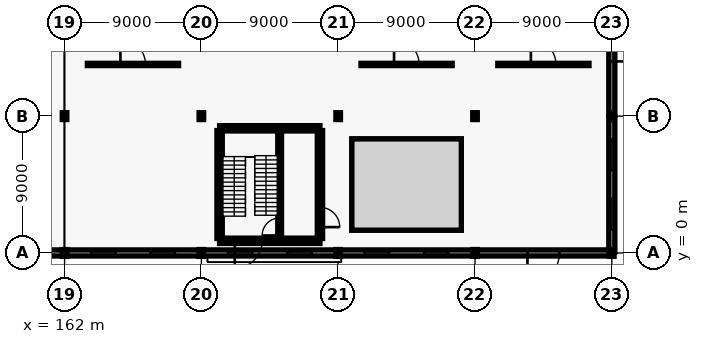
"""IFC4 building model, lengths in metres.
Left out: names, types, materials, properties, quantities, classifications, styles, units other than length and angle.
Written with IfcOpenShell. Run it as: python <this file> out.ifc"""

import sys

from ifc_helpers import new_model, si_unit, direction, frame, frame_2d, origin, origin_2d, place, context, subcontext, project, spatial, rectangle, i_section, extrude, element, fill, save


model = new_model("IFC4")
c1 = context("Model", 3, precision=1e-05, world=origin(), true_north=direction((0.0, 1.0)))
c2 = subcontext(c1, "Body", "Model", "MODEL_VIEW")
j1 = project(units=[si_unit("LENGTHUNIT", "METRE"), si_unit("PLANEANGLEUNIT", "RADIAN")], contexts=[c1])
p1 = place(None, origin())
s1 = spatial("IfcSite", under=j1, at=p1, CompositionType="ELEMENT")
p2 = place(p1, origin())
s2 = spatial("IfcBuilding", under=s1, at=p2, CompositionType="ELEMENT")
p3 = place(p2, origin())
s3 = spatial("IfcBuildingStorey", under=s2, at=p3, CompositionType="ELEMENT", Elevation=0.0)
for number, where, z_axis, x_axis in (
    (1, (162.0, 0.0, 0.0), (0.0, 0.0, 1.0), (1.0, 0.0, 0.0)),
    (2, (162.0, 9.0, 0.0), (0.0, 0.0, 1.0), (1.0, 0.0, 0.0)),
    (3, (171.0, 0.0, 0.0), (0.0, 0.0, 1.0), (1.0, 0.0, 0.0)),
    (4, (171.0, 9.0, 0.0), (0.0, 0.0, 1.0), (1.0, 0.0, 0.0)),
    (5, (180.0, 0.0, 0.0), (0.0, 0.0, 1.0), (1.0, 0.0, 0.0)),
    (6, (180.0, 9.0, 0.0), (0.0, 0.0, 1.0), (1.0, 0.0, 0.0)),
    (7, (189.0, 0.0, 0.0), (0.0, 0.0, 1.0), (1.0, 0.0, 0.0)),
    (8, (189.0, 9.0, 0.0), (0.0, 0.0, 1.0), (1.0, 0.0, 0.0)),
    (9, (198.0, 0.0, 0.0), (0.0, 0.0, 1.0), (1.0, 0.0, 0.0)),
    (10, (198.0, 9.0, 0.0), (0.0, 0.0, 1.0), (1.0, 0.0, 0.0)),
):
    element("IfcColumn", number, at=place(p3, frame(where, z_axis=z_axis, x_axis=x_axis)), inside=s3, PredefinedType="COLUMN", context=c2, shape_type="SweptSolid", body=[
        extrude(i_section(OverallWidth=0.3, OverallDepth=0.45, WebThickness=0.014, FlangeThickness=0.026, FilletRadius=0.027, at=origin_2d()), origin(), (0.0, 0.0, 1.0), 5.4),
    ])
p4 = place(p3, frame((153.06, 0.0, 0.0), z_axis=(0.0, 0.0, 1.0), x_axis=(1.0, 0.0, 0.0)))
e11 = element("IfcWall", 11, at=p4, inside=s3, PredefinedType="SOLIDWALL", context=c2, shape_type="SweptSolid", body=[
    extrude(rectangle(XDim=8.88, YDim=0.4, at=frame_2d((4.44, 0.0))), origin(), (0.0, 0.0, 1.0), 4.7),
])
p5 = place(p4, frame((3.24, 0.0, 0.0)))
e12 = element("IfcOpeningElement", 12, at=p5, cuts=e11, PredefinedType="OPENING", context=c2, shape_type="SweptSolid", body=[
    extrude(rectangle(XDim=2.4, YDim=2.5, at=frame_2d((1.2, 1.25))), frame((0.0, 0.21, 0.0), z_axis=(0.0, -1.0, 0.0), x_axis=(1.0, 0.0, 0.0)), (0.0, 0.0, 1.0), 0.42),
])
p6 = place(p3, frame((162.06, 0.0, 0.0), z_axis=(0.0, 0.0, 1.0), x_axis=(1.0, 0.0, 0.0)))
e13 = element("IfcWall", 13, at=p6, inside=s3, PredefinedType="SOLIDWALL", context=c2, shape_type="SweptSolid", body=[
    extrude(rectangle(XDim=8.88, YDim=0.4, at=frame_2d((4.44, 0.0))), origin(), (0.0, 0.0, 1.0), 4.7),
])
p7 = place(p6, frame((1.686, 0.0, 0.9)))
e14 = element("IfcOpeningElement", 14, at=p7, cuts=e13, PredefinedType="OPENING", context=c2, shape_type="SweptSolid", body=[
    extrude(rectangle(XDim=1.6, YDim=2.4, at=frame_2d((0.8, 1.2))), frame((0.0, 0.21, 0.0), z_axis=(0.0, -1.0, 0.0), x_axis=(1.0, 0.0, 0.0)), (0.0, 0.0, 1.0), 0.42),
])
p8 = place(p6, frame((5.594, 0.0, 0.9)))
e15 = element("IfcOpeningElement", 15, at=p8, cuts=e13, PredefinedType="OPENING", context=c2, shape_type="SweptSolid", body=[
    extrude(rectangle(XDim=1.6, YDim=2.4, at=frame_2d((0.8, 1.2))), frame((0.0, 0.21, 0.0), z_axis=(0.0, -1.0, 0.0), x_axis=(1.0, 0.0, 0.0)), (0.0, 0.0, 1.0), 0.42),
])
p9 = place(p3, frame((171.06, 0.0, 0.0), z_axis=(0.0, 0.0, 1.0), x_axis=(1.0, 0.0, 0.0)))
e16 = element("IfcWall", 16, at=p9, inside=s3, PredefinedType="SOLIDWALL", context=c2, shape_type="SweptSolid", body=[
    extrude(rectangle(XDim=8.88, YDim=0.4, at=frame_2d((4.44, 0.0))), origin(), (0.0, 0.0, 1.0), 4.7),
])
p10 = place(p9, frame((1.686, 0.0, 0.9)))
e17 = element("IfcOpeningElement", 17, at=p10, cuts=e16, PredefinedType="OPENING", context=c2, shape_type="SweptSolid", body=[
    extrude(rectangle(XDim=1.6, YDim=2.4, at=frame_2d((0.8, 1.2))), frame((0.0, 0.21, 0.0), z_axis=(0.0, -1.0, 0.0), x_axis=(1.0, 0.0, 0.0)), (0.0, 0.0, 1.0), 0.42),
])
p11 = place(p9, frame((5.594, 0.0, 0.9)))
e18 = element("IfcOpeningElement", 18, at=p11, cuts=e16, PredefinedType="OPENING", context=c2, shape_type="SweptSolid", body=[
    extrude(rectangle(XDim=1.6, YDim=2.4, at=frame_2d((0.8, 1.2))), frame((0.0, 0.21, 0.0), z_axis=(0.0, -1.0, 0.0), x_axis=(1.0, 0.0, 0.0)), (0.0, 0.0, 1.0), 0.42),
])
p12 = place(p3, frame((180.06, 0.0, 0.0), z_axis=(0.0, 0.0, 1.0), x_axis=(1.0, 0.0, 0.0)))
e19 = element("IfcWall", 19, at=p12, inside=s3, PredefinedType="SOLIDWALL", context=c2, shape_type="SweptSolid", body=[
    extrude(rectangle(XDim=8.88, YDim=0.4, at=frame_2d((4.44, 0.0))), origin(), (0.0, 0.0, 1.0), 4.7),
])
p13 = place(p12, frame((1.686, 0.0, 0.9)))
e20 = element("IfcOpeningElement", 20, at=p13, cuts=e19, PredefinedType="OPENING", context=c2, shape_type="SweptSolid", body=[
    extrude(rectangle(XDim=1.6, YDim=2.4, at=frame_2d((0.8, 1.2))), frame((0.0, 0.21, 0.0), z_axis=(0.0, -1.0, 0.0), x_axis=(1.0, 0.0, 0.0)), (0.0, 0.0, 1.0), 0.42),
])
p14 = place(p12, frame((5.594, 0.0, 0.9)))
e21 = element("IfcOpeningElement", 21, at=p14, cuts=e19, PredefinedType="OPENING", context=c2, shape_type="SweptSolid", body=[
    extrude(rectangle(XDim=1.6, YDim=2.4, at=frame_2d((0.8, 1.2))), frame((0.0, 0.21, 0.0), z_axis=(0.0, -1.0, 0.0), x_axis=(1.0, 0.0, 0.0)), (0.0, 0.0, 1.0), 0.42),
])
p15 = place(p3, frame((189.06, 0.0, 0.0), z_axis=(0.0, 0.0, 1.0), x_axis=(1.0, 0.0, 0.0)))
e22 = element("IfcWall", 22, at=p15, inside=s3, PredefinedType="SOLIDWALL", context=c2, shape_type="SweptSolid", body=[
    extrude(rectangle(XDim=8.88, YDim=0.4, at=frame_2d((4.44, 0.0))), origin(), (0.0, 0.0, 1.0), 4.7),
])
p16 = place(p15, frame((3.39, 0.0, 0.0)))
e23 = element("IfcOpeningElement", 23, at=p16, cuts=e22, PredefinedType="OPENING", context=c2, shape_type="SweptSolid", body=[
    extrude(rectangle(XDim=2.1, YDim=2.35, at=frame_2d((1.05, 1.175))), frame((0.0, 0.21, 0.0), z_axis=(0.0, -1.0, 0.0), x_axis=(1.0, 0.0, 0.0)), (0.0, 0.0, 1.0), 0.42),
])
p17 = place(p3, frame((198.0, 0.06, 0.0), z_axis=(0.0, 0.0, 1.0), x_axis=(0.0, 1.0, 0.0)))
e24 = element("IfcWall", 24, at=p17, inside=s3, PredefinedType="SOLIDWALL", context=c2, shape_type="SweptSolid", body=[
    extrude(rectangle(XDim=8.88, YDim=0.4, at=frame_2d((4.44, 0.0))), origin(), (0.0, 0.0, 1.0), 4.7),
])
p18 = place(p17, frame((1.486, 0.0, 0.9)))
e25 = element("IfcOpeningElement", 25, at=p18, cuts=e24, PredefinedType="OPENING", context=c2, shape_type="SweptSolid", body=[
    extrude(rectangle(XDim=2.0, YDim=2.4, at=frame_2d((1.0, 1.2))), frame((0.0, 0.21, 0.0), z_axis=(0.0, -1.0, 0.0), x_axis=(1.0, 0.0, 0.0)), (0.0, 0.0, 1.0), 0.42),
])
p19 = place(p17, frame((5.394, 0.0, 0.9)))
e26 = element("IfcOpeningElement", 26, at=p19, cuts=e24, PredefinedType="OPENING", context=c2, shape_type="SweptSolid", body=[
    extrude(rectangle(XDim=2.0, YDim=2.4, at=frame_2d((1.0, 1.2))), frame((0.0, 0.21, 0.0), z_axis=(0.0, -1.0, 0.0), x_axis=(1.0, 0.0, 0.0)), (0.0, 0.0, 1.0), 0.42),
])
p20 = place(p3, frame((198.0, 9.06, 0.0), z_axis=(0.0, 0.0, 1.0), x_axis=(0.0, 1.0, 0.0)))
e27 = element("IfcWall", 27, at=p20, inside=s3, PredefinedType="SOLIDWALL", context=c2, shape_type="SweptSolid", body=[
    extrude(rectangle(XDim=8.88, YDim=0.4, at=frame_2d((4.44, 0.0))), origin(), (0.0, 0.0, 1.0), 4.7),
])
p21 = place(p20, frame((3.54, 0.0, 0.0)))
e28 = element("IfcOpeningElement", 28, at=p21, cuts=e27, PredefinedType="OPENING", context=c2, shape_type="SweptSolid", body=[
    extrude(rectangle(XDim=1.8, YDim=2.2, at=frame_2d((0.9, 1.1))), frame((0.0, 0.21, 0.0), z_axis=(0.0, -1.0, 0.0), x_axis=(1.0, 0.0, 0.0)), (0.0, 0.0, 1.0), 0.42),
])
p22 = place(p3, frame((172.2, 0.8, 0.0), z_axis=(0.0, 0.0, 1.0), x_axis=(1.0, 0.0, 0.0)))
e29 = element("IfcWall", 29, at=p22, inside=s3, PredefinedType="SHEAR", context=c2, shape_type="SweptSolid", body=[
    extrude(rectangle(XDim=6.6, YDim=0.35, at=frame_2d((3.3, 0.0))), origin(), (0.0, 0.0, 1.0), 5.4),
])
p23 = place(p22, frame((1.0, 0.0, 0.0)))
e30 = element("IfcOpeningElement", 30, at=p23, cuts=e29, PredefinedType="OPENING", context=c2, shape_type="SweptSolid", body=[
    extrude(rectangle(XDim=1.8, YDim=2.15, at=frame_2d((0.9, 1.075))), frame((0.0, 0.185, 0.0), z_axis=(0.0, -1.0, 0.0), x_axis=(1.0, 0.0, 0.0)), (0.0, 0.0, 1.0), 0.37),
])
p24 = place(p3, frame((172.2, 8.2, 0.0), z_axis=(0.0, 0.0, 1.0), x_axis=(1.0, 0.0, 0.0)))
e31 = element("IfcWall", 31, at=p24, inside=s3, PredefinedType="SHEAR", context=c2, shape_type="SweptSolid", body=[
    extrude(rectangle(XDim=6.6, YDim=0.35, at=frame_2d((3.3, 0.0))), origin(), (0.0, 0.0, 1.0), 5.4),
])
p25 = place(p3, frame((172.2, 0.95, 0.0), z_axis=(0.0, 0.0, 1.0), x_axis=(0.0, 1.0, 0.0)))
e32 = element("IfcWall", 32, at=p25, inside=s3, PredefinedType="SHEAR", context=c2, shape_type="SweptSolid", body=[
    extrude(rectangle(XDim=7.1, YDim=0.35, at=frame_2d((3.55, 0.0))), origin(), (0.0, 0.0, 1.0), 5.4),
])
p26 = place(p3, frame((178.8, 0.95, 0.0), z_axis=(0.0, 0.0, 1.0), x_axis=(0.0, 1.0, 0.0)))
e33 = element("IfcWall", 33, at=p26, inside=s3, PredefinedType="SHEAR", context=c2, shape_type="SweptSolid", body=[
    extrude(rectangle(XDim=7.1, YDim=0.35, at=frame_2d((3.55, 0.0))), origin(), (0.0, 0.0, 1.0), 5.4),
])
p27 = place(p26, frame((0.75, 0.0, 0.0)))
e34 = element("IfcOpeningElement", 34, at=p27, cuts=e33, PredefinedType="OPENING", context=c2, shape_type="SweptSolid", body=[
    extrude(rectangle(XDim=1.3, YDim=2.15, at=frame_2d((0.65, 1.075))), frame((0.0, 0.185, 0.0), z_axis=(0.0, -1.0, 0.0), x_axis=(1.0, 0.0, 0.0)), (0.0, 0.0, 1.0), 0.37),
])
p28 = place(p3, frame((176.15, 0.95, 0.0), z_axis=(0.0, 0.0, 1.0), x_axis=(0.0, 1.0, 0.0)))
e35 = element("IfcWall", 35, at=p28, inside=s3, PredefinedType="SHEAR", context=c2, shape_type="SweptSolid", body=[
    extrude(rectangle(XDim=7.1, YDim=0.25, at=frame_2d((3.55, 0.0))), origin(), (0.0, 0.0, 1.0), 5.4),
])
p29 = place(p28, frame((0.2, 0.0, 0.0)))
e36 = element("IfcOpeningElement", 36, at=p29, cuts=e35, PredefinedType="OPENING", context=c2, shape_type="SweptSolid", body=[
    extrude(rectangle(XDim=1.15, YDim=2.15, at=frame_2d((0.575, 1.075))), frame((0.0, 0.135, 0.0), z_axis=(0.0, -1.0, 0.0), x_axis=(1.0, 0.0, 0.0)), (0.0, 0.0, 1.0), 0.27),
])
p30 = place(p3, frame((163.5, 12.4, 0.0), z_axis=(0.0, 0.0, 1.0), x_axis=(1.0, 0.0, 0.0)))
e37 = element("IfcWall", 37, at=p30, inside=s3, PredefinedType="PARTITIONING", context=c2, shape_type="SweptSolid", body=[
    extrude(rectangle(XDim=6.0, YDim=0.15, at=frame_2d((3.0, 0.0))), origin(), (0.0, 0.0, 1.0), 4.3),
])
p31 = place(p30, frame((2.175, 0.0, 0.0)))
e38 = element("IfcOpeningElement", 38, at=p31, cuts=e37, PredefinedType="OPENING", context=c2, shape_type="SweptSolid", body=[
    extrude(rectangle(XDim=1.65, YDim=2.25, at=frame_2d((0.825, 1.125))), frame((0.0, 0.085, 0.0), z_axis=(0.0, -1.0, 0.0), x_axis=(1.0, 0.0, 0.0)), (0.0, 0.0, 1.0), 0.17),
])
p32 = place(p3, frame((181.5, 12.4, 0.0), z_axis=(0.0, 0.0, 1.0), x_axis=(1.0, 0.0, 0.0)))
e39 = element("IfcWall", 39, at=p32, inside=s3, PredefinedType="PARTITIONING", context=c2, shape_type="SweptSolid", body=[
    extrude(rectangle(XDim=6.0, YDim=0.15, at=frame_2d((3.0, 0.0))), origin(), (0.0, 0.0, 1.0), 4.3),
])
p33 = place(p32, frame((2.175, 0.0, 0.0)))
e40 = element("IfcOpeningElement", 40, at=p33, cuts=e39, PredefinedType="OPENING", context=c2, shape_type="SweptSolid", body=[
    extrude(rectangle(XDim=1.65, YDim=2.25, at=frame_2d((0.825, 1.125))), frame((0.0, 0.085, 0.0), z_axis=(0.0, -1.0, 0.0), x_axis=(1.0, 0.0, 0.0)), (0.0, 0.0, 1.0), 0.17),
])
p34 = place(p3, frame((190.5, 12.4, 0.0), z_axis=(0.0, 0.0, 1.0), x_axis=(1.0, 0.0, 0.0)))
e41 = element("IfcWall", 41, at=p34, inside=s3, PredefinedType="PARTITIONING", context=c2, shape_type="SweptSolid", body=[
    extrude(rectangle(XDim=6.0, YDim=0.15, at=frame_2d((3.0, 0.0))), origin(), (0.0, 0.0, 1.0), 4.3),
])
p35 = place(p34, frame((2.175, 0.0, 0.0)))
e42 = element("IfcOpeningElement", 42, at=p35, cuts=e41, PredefinedType="OPENING", context=c2, shape_type="SweptSolid", body=[
    extrude(rectangle(XDim=1.65, YDim=2.25, at=frame_2d((0.825, 1.125))), frame((0.0, 0.085, 0.0), z_axis=(0.0, -1.0, 0.0), x_axis=(1.0, 0.0, 0.0)), (0.0, 0.0, 1.0), 0.17),
])
p36 = place(p7, origin())
e43 = element("IfcWindow", 43, at=p36, inside=s3, PartitioningType="SINGLE_PANEL", PredefinedType="WINDOW", context=c2, shape_type="SweptSolid", body=[
    extrude(rectangle(XDim=1.6, YDim=2.4, at=frame_2d((0.8, 1.2))), frame((0.0, 0.03, 0.0), z_axis=(0.0, -1.0, 0.0), x_axis=(1.0, 0.0, 0.0)), (0.0, 0.0, 1.0), 0.06),
])
fill(e14, e43)
p37 = place(p8, origin())
e44 = element("IfcWindow", 44, at=p37, inside=s3, PartitioningType="SINGLE_PANEL", PredefinedType="WINDOW", context=c2, shape_type="SweptSolid", body=[
    extrude(rectangle(XDim=1.6, YDim=2.4, at=frame_2d((0.8, 1.2))), frame((0.0, 0.03, 0.0), z_axis=(0.0, -1.0, 0.0), x_axis=(1.0, 0.0, 0.0)), (0.0, 0.0, 1.0), 0.06),
])
fill(e15, e44)
p38 = place(p10, origin())
e45 = element("IfcWindow", 45, at=p38, inside=s3, PartitioningType="SINGLE_PANEL", PredefinedType="WINDOW", context=c2, shape_type="SweptSolid", body=[
    extrude(rectangle(XDim=1.6, YDim=2.4, at=frame_2d((0.8, 1.2))), frame((0.0, 0.03, 0.0), z_axis=(0.0, -1.0, 0.0), x_axis=(1.0, 0.0, 0.0)), (0.0, 0.0, 1.0), 0.06),
])
fill(e17, e45)
p39 = place(p11, origin())
e46 = element("IfcWindow", 46, at=p39, inside=s3, PartitioningType="SINGLE_PANEL", PredefinedType="WINDOW", context=c2, shape_type="SweptSolid", body=[
    extrude(rectangle(XDim=1.6, YDim=2.4, at=frame_2d((0.8, 1.2))), frame((0.0, 0.03, 0.0), z_axis=(0.0, -1.0, 0.0), x_axis=(1.0, 0.0, 0.0)), (0.0, 0.0, 1.0), 0.06),
])
fill(e18, e46)
p40 = place(p13, origin())
e47 = element("IfcWindow", 47, at=p40, inside=s3, PartitioningType="SINGLE_PANEL", PredefinedType="WINDOW", context=c2, shape_type="SweptSolid", body=[
    extrude(rectangle(XDim=1.6, YDim=2.4, at=frame_2d((0.8, 1.2))), frame((0.0, 0.03, 0.0), z_axis=(0.0, -1.0, 0.0), x_axis=(1.0, 0.0, 0.0)), (0.0, 0.0, 1.0), 0.06),
])
fill(e20, e47)
p41 = place(p14, origin())
e48 = element("IfcWindow", 48, at=p41, inside=s3, PartitioningType="SINGLE_PANEL", PredefinedType="WINDOW", context=c2, shape_type="SweptSolid", body=[
    extrude(rectangle(XDim=1.6, YDim=2.4, at=frame_2d((0.8, 1.2))), frame((0.0, 0.03, 0.0), z_axis=(0.0, -1.0, 0.0), x_axis=(1.0, 0.0, 0.0)), (0.0, 0.0, 1.0), 0.06),
])
fill(e21, e48)
p42 = place(p16, frame((2.1, 0.0, 0.0), z_axis=(0.0, 0.0, 1.0), x_axis=(-1.0, 0.0, 0.0)))
e49 = element("IfcDoor", 49, at=p42, inside=s3, OperationType="DOUBLE_DOOR_SINGLE_SWING", PredefinedType="DOOR", context=c2, shape_type="SweptSolid", body=[
    extrude(rectangle(XDim=2.1, YDim=2.35, at=frame_2d((1.05, 1.175))), frame((0.0, 0.025, 0.0), z_axis=(0.0, -1.0, 0.0), x_axis=(1.0, 0.0, 0.0)), (0.0, 0.0, 1.0), 0.05),
])
fill(e23, e49)
p43 = place(p18, origin())
e50 = element("IfcWindow", 50, at=p43, inside=s3, PartitioningType="SINGLE_PANEL", PredefinedType="WINDOW", context=c2, shape_type="SweptSolid", body=[
    extrude(rectangle(XDim=2.0, YDim=2.4, at=frame_2d((1.0, 1.2))), frame((0.0, 0.03, 0.0), z_axis=(0.0, -1.0, 0.0), x_axis=(1.0, 0.0, 0.0)), (0.0, 0.0, 1.0), 0.06),
])
fill(e25, e50)
p44 = place(p19, origin())
e51 = element("IfcWindow", 51, at=p44, inside=s3, PartitioningType="SINGLE_PANEL", PredefinedType="WINDOW", context=c2, shape_type="SweptSolid", body=[
    extrude(rectangle(XDim=2.0, YDim=2.4, at=frame_2d((1.0, 1.2))), frame((0.0, 0.03, 0.0), z_axis=(0.0, -1.0, 0.0), x_axis=(1.0, 0.0, 0.0)), (0.0, 0.0, 1.0), 0.06),
])
fill(e26, e51)
p45 = place(p21, frame((1.8, 0.0, 0.0), z_axis=(0.0, 0.0, 1.0), x_axis=(-1.0, 0.0, 0.0)))
e52 = element("IfcDoor", 52, at=p45, inside=s3, OperationType="DOUBLE_DOOR_SINGLE_SWING", PredefinedType="DOOR", context=c2, shape_type="SweptSolid", body=[
    extrude(rectangle(XDim=1.8, YDim=2.2, at=frame_2d((0.9, 1.1))), frame((0.0, 0.025, 0.0), z_axis=(0.0, -1.0, 0.0), x_axis=(1.0, 0.0, 0.0)), (0.0, 0.0, 1.0), 0.05),
])
fill(e28, e52)
p46 = place(p27, frame((1.3, 0.0, 0.0), z_axis=(0.0, 0.0, 1.0), x_axis=(-1.0, 0.0, 0.0)))
e53 = element("IfcDoor", 53, at=p46, inside=s3, OperationType="DOUBLE_DOOR_SINGLE_SWING", PredefinedType="DOOR", context=c2, shape_type="SweptSolid", body=[
    extrude(rectangle(XDim=1.3, YDim=2.15, at=frame_2d((0.65, 1.075))), frame((0.0, 0.025, 0.0), z_axis=(0.0, -1.0, 0.0), x_axis=(1.0, 0.0, 0.0)), (0.0, 0.0, 1.0), 0.05),
])
fill(e34, e53)
p47 = place(p29, origin())
e54 = element("IfcDoor", 54, at=p47, inside=s3, OperationType="SINGLE_SWING_LEFT", PredefinedType="DOOR", context=c2, shape_type="SweptSolid", body=[
    extrude(rectangle(XDim=1.15, YDim=2.15, at=frame_2d((0.575, 1.075))), frame((0.0, 0.025, 0.0), z_axis=(0.0, -1.0, 0.0), x_axis=(1.0, 0.0, 0.0)), (0.0, 0.0, 1.0), 0.05),
])
fill(e36, e54)
p48 = place(p23, frame((1.8, 0.0, 0.0), z_axis=(0.0, 0.0, 1.0), x_axis=(-1.0, 0.0, 0.0)))
e55 = element("IfcDoor", 55, at=p48, inside=s3, OperationType="DOUBLE_DOOR_SINGLE_SWING", PredefinedType="DOOR", context=c2, shape_type="SweptSolid", body=[
    extrude(rectangle(XDim=1.8, YDim=2.15, at=frame_2d((0.9, 1.075))), frame((0.0, 0.025, 0.0), z_axis=(0.0, -1.0, 0.0), x_axis=(1.0, 0.0, 0.0)), (0.0, 0.0, 1.0), 0.05),
])
fill(e30, e55)
p49 = place(p31, origin())
e56 = element("IfcDoor", 56, at=p49, inside=s3, OperationType="DOUBLE_DOOR_SINGLE_SWING", PredefinedType="DOOR", context=c2, shape_type="SweptSolid", body=[
    extrude(rectangle(XDim=1.65, YDim=2.25, at=frame_2d((0.825, 1.125))), frame((0.0, 0.025, 0.0), z_axis=(0.0, -1.0, 0.0), x_axis=(1.0, 0.0, 0.0)), (0.0, 0.0, 1.0), 0.05),
])
fill(e38, e56)
p50 = place(p33, origin())
e57 = element("IfcDoor", 57, at=p50, inside=s3, OperationType="DOUBLE_DOOR_SINGLE_SWING", PredefinedType="DOOR", context=c2, shape_type="SweptSolid", body=[
    extrude(rectangle(XDim=1.65, YDim=2.25, at=frame_2d((0.825, 1.125))), frame((0.0, 0.025, 0.0), z_axis=(0.0, -1.0, 0.0), x_axis=(1.0, 0.0, 0.0)), (0.0, 0.0, 1.0), 0.05),
])
fill(e40, e57)
p51 = place(p35, origin())
e58 = element("IfcDoor", 58, at=p51, inside=s3, OperationType="DOUBLE_DOOR_SINGLE_SWING", PredefinedType="DOOR", context=c2, shape_type="SweptSolid", body=[
    extrude(rectangle(XDim=1.65, YDim=2.25, at=frame_2d((0.825, 1.125))), frame((0.0, 0.025, 0.0), z_axis=(0.0, -1.0, 0.0), x_axis=(1.0, 0.0, 0.0)), (0.0, 0.0, 1.0), 0.05),
])
fill(e42, e58)
save(model, sys.argv[1])
